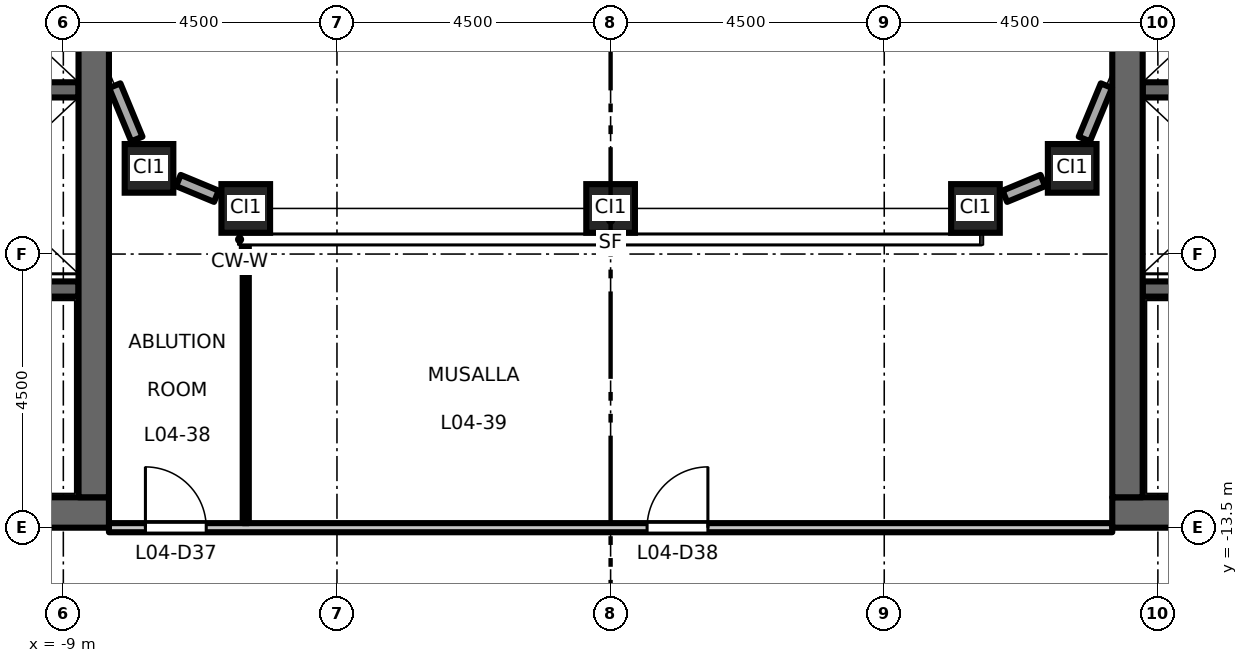
"""IFC4 building model, lengths in metres.
Left out: names, types, materials, properties, quantities, classifications, styles, units other than length and angle.
Written with IfcOpenShell. Run it as: python <this file> out.ifc"""

import sys

from ifc_helpers import new_model, si_unit, direction, frame, frame_2d, origin, origin_2d, place, context, subcontext, project, spatial, rectangle, hollow_rectangle, extrude, element, fill, save


model = new_model("IFC4")
c1 = context("Model", 3, precision=1e-05, world=origin(), true_north=direction((0.0, 1.0)))
c2 = subcontext(c1, "Body", "Model", "MODEL_VIEW")
j1 = project(units=[si_unit("LENGTHUNIT", "METRE"), si_unit("PLANEANGLEUNIT", "RADIAN")], contexts=[c1])
p1 = place(None, origin())
s1 = spatial("IfcSite", under=j1, at=p1, CompositionType="ELEMENT")
p2 = place(p1, origin())
s2 = spatial("IfcBuilding", under=s1, at=p2, CompositionType="ELEMENT")
p3 = place(p2, frame((0.0, 0.0, 22.2)))
s3 = spatial("IfcBuildingStorey", under=s2, at=p3, CompositionType="ELEMENT", Elevation=22.2)
for number, where, z_axis, x_axis in (
    (1, (-7.591, -7.591, 0.0), (0.0, 0.0, 1.0), (1.0, 0.0, 0.0)),
    (2, (-6.0, -8.25, 0.0), (0.0, 0.0, 1.0), (1.0, 0.0, 0.0)),
    (3, (0.0, -8.25, 0.0), (0.0, 0.0, 1.0), (1.0, 0.0, 0.0)),
    (4, (6.0, -8.25, 0.0), (0.0, 0.0, 1.0), (1.0, 0.0, 0.0)),
    (5, (7.591, -7.591, 0.0), (0.0, 0.0, 1.0), (1.0, 0.0, 0.0)),
):
    element("IfcColumn", number, at=place(p3, frame(where, z_axis=z_axis, x_axis=x_axis)), inside=s3, PredefinedType="COLUMN", context=c2, shape_type="SweptSolid", body=[
        extrude(hollow_rectangle(XDim=0.8, YDim=0.8, WallThickness=0.05, at=origin_2d()), origin(), (0.0, 0.0, 1.0), 4.5),
    ])
p4 = place(p3, frame((-8.75, -6.3, 0.0), z_axis=(0.0, 0.0, 1.0), x_axis=(-1.0, 0.0, 0.0)))
e6 = element("IfcWall", 6, at=p4, inside=s3, PredefinedType="SHEAR", context=c2, shape_type="SweptSolid", body=[
    extrude(rectangle(XDim=3.1, YDim=0.25, at=frame_2d((1.55, 0.0))), origin(), (0.0, 0.0, 1.0), 4.35),
])
p5 = place(p3, frame((-8.75, -9.575, 0.0), z_axis=(0.0, 0.0, 1.0), x_axis=(-1.0, 0.0, 0.0)))
e7 = element("IfcWall", 7, at=p5, inside=s3, PredefinedType="SHEAR", context=c2, shape_type="SweptSolid", body=[
    extrude(rectangle(XDim=8.0, YDim=0.25, at=frame_2d((4.0, 0.0))), origin(), (0.0, 0.0, 1.0), 4.35),
])
p6 = place(p5, frame((6.65, 0.0, 0.0)))
e8 = element("IfcOpeningElement", 8, at=p6, cuts=e7, PredefinedType="OPENING", context=c2, shape_type="SweptSolid", body=[
    extrude(rectangle(XDim=1.1, YDim=2.1, at=frame_2d((0.55, 1.05))), frame((0.0, 0.135, 0.0), z_axis=(0.0, -1.0, 0.0), x_axis=(1.0, 0.0, 0.0)), (0.0, 0.0, 1.0), 0.27),
])
p7 = place(p3, frame((-8.25, -13.25, 0.0), z_axis=(0.0, 0.0, 1.0), x_axis=(-1.0, 0.0, 0.0)))
e9 = element("IfcWall", 9, at=p7, inside=s3, PredefinedType="SHEAR", context=c2, shape_type="SweptSolid", body=[
    extrude(rectangle(XDim=13.5, YDim=0.5, at=frame_2d((6.75, 0.0))), origin(), (0.0, 0.0, 1.0), 4.35),
])
p8 = place(p3, frame((-8.5, -13.0, 0.0), z_axis=(0.0, 0.0, 1.0), x_axis=(0.0, 1.0, 0.0)))
e10 = element("IfcWall", 10, at=p8, inside=s3, PredefinedType="SHEAR", context=c2, shape_type="SweptSolid", body=[
    extrude(rectangle(XDim=26.0, YDim=0.5, at=frame_2d((13.0, 0.0))), origin(), (0.0, 0.0, 1.0), 4.35),
])
p9 = place(p3, frame((8.75, -6.3, 0.0), z_axis=(0.0, 0.0, 1.0), x_axis=(1.0, 0.0, 0.0)))
e11 = element("IfcWall", 11, at=p9, inside=s3, PredefinedType="SHEAR", context=c2, shape_type="SweptSolid", body=[
    extrude(rectangle(XDim=3.1, YDim=0.25, at=frame_2d((1.55, 0.0))), origin(), (0.0, 0.0, 1.0), 4.35),
])
p10 = place(p3, frame((8.75, -9.575, 0.0), z_axis=(0.0, 0.0, 1.0), x_axis=(1.0, 0.0, 0.0)))
e12 = element("IfcWall", 12, at=p10, inside=s3, PredefinedType="SHEAR", context=c2, shape_type="SweptSolid", body=[
    extrude(rectangle(XDim=8.0, YDim=0.25, at=frame_2d((4.0, 0.0))), origin(), (0.0, 0.0, 1.0), 4.35),
])
p11 = place(p10, frame((6.65, 0.0, 0.0)))
e13 = element("IfcOpeningElement", 13, at=p11, cuts=e12, PredefinedType="OPENING", context=c2, shape_type="SweptSolid", body=[
    extrude(rectangle(XDim=1.1, YDim=2.1, at=frame_2d((0.55, 1.05))), frame((0.0, 0.135, 0.0), z_axis=(0.0, -1.0, 0.0), x_axis=(1.0, 0.0, 0.0)), (0.0, 0.0, 1.0), 0.27),
])
p12 = place(p3, frame((8.25, -13.25, 0.0), z_axis=(0.0, 0.0, 1.0), x_axis=(1.0, 0.0, 0.0)))
e14 = element("IfcWall", 14, at=p12, inside=s3, PredefinedType="SHEAR", context=c2, shape_type="SweptSolid", body=[
    extrude(rectangle(XDim=13.5, YDim=0.5, at=frame_2d((6.75, 0.0))), origin(), (0.0, 0.0, 1.0), 4.35),
])
p13 = place(p3, frame((8.5, -13.0, 0.0), z_axis=(0.0, 0.0, 1.0), x_axis=(0.0, 1.0, 0.0)))
e15 = element("IfcWall", 15, at=p13, inside=s3, PredefinedType="SHEAR", context=c2, shape_type="SweptSolid", body=[
    extrude(rectangle(XDim=26.0, YDim=0.5, at=frame_2d((13.0, 0.0))), origin(), (0.0, 0.0, 1.0), 4.35),
])
p14 = place(p3, frame((6.483, -8.05, 0.0), z_axis=(0.0, 0.0, 1.0), x_axis=(0.923854141361, 0.382744726273, 0.0)))
e16 = element("IfcWall", 16, at=p14, inside=s3, PredefinedType="STANDARD", context=c2, shape_type="SweptSolid", body=[
    extrude(rectangle(XDim=0.677, YDim=0.2, at=frame_2d((0.338, 0.0))), origin(), (0.0, 0.0, 1.0), 3.73),
])
for number, where, z_axis, x_axis in (
    (17, (7.791, -7.108, 0.0), (0.0, 0.0, 1.0), (0.383, 0.924, 0.0)),
    (18, (-8.154, -6.231, 0.0), (0.0, 0.0, 1.0), (0.383, -0.924, 0.0)),
):
    element("IfcWall", number, at=place(p3, frame(where, z_axis=z_axis, x_axis=x_axis)), inside=s3, PredefinedType="STANDARD", context=c2, shape_type="SweptSolid", body=[
        extrude(rectangle(XDim=0.949, YDim=0.2, at=frame_2d((0.475, 0.0))), origin(), (0.0, 0.0, 1.0), 3.73),
    ])
p15 = place(p3, frame((-7.108, -7.791, 0.0), z_axis=(0.0, 0.0, 1.0), x_axis=(0.923854141361, -0.382744726273, 0.0)))
e19 = element("IfcWall", 19, at=p15, inside=s3, PredefinedType="STANDARD", context=c2, shape_type="SweptSolid", body=[
    extrude(rectangle(XDim=0.677, YDim=0.2, at=frame_2d((0.338, 0.0))), origin(), (0.0, 0.0, 1.0), 3.73),
])
p16 = place(p3, frame((-8.25, -13.5, 0.0), z_axis=(0.0, 0.0, 1.0), x_axis=(1.0, 0.0, 0.0)))
e20 = element("IfcWall", 20, at=p16, inside=s3, PredefinedType="PARTITIONING", context=c2, shape_type="SweptSolid", body=[
    extrude(rectangle(XDim=16.5, YDim=0.15, at=frame_2d((8.25, 0.0))), origin(), (0.0, 0.0, 1.0), 3.85),
])
p17 = place(p16, frame((0.6, 0.0, 0.0)))
e21 = element("IfcOpeningElement", 21, at=p17, cuts=e20, PredefinedType="OPENING", context=c2, shape_type="SweptSolid", body=[
    extrude(rectangle(XDim=1.0, YDim=2.1, at=frame_2d((0.5, 1.05))), frame((0.0, 0.085, 0.0), z_axis=(0.0, -1.0, 0.0), x_axis=(1.0, 0.0, 0.0)), (0.0, 0.0, 1.0), 0.17),
])
p18 = place(p16, frame((8.85, 0.0, 0.0)))
e22 = element("IfcOpeningElement", 22, at=p18, cuts=e20, PredefinedType="OPENING", context=c2, shape_type="SweptSolid", body=[
    extrude(rectangle(XDim=1.0, YDim=2.1, at=frame_2d((0.5, 1.05))), frame((0.0, 0.085, 0.0), z_axis=(0.0, -1.0, 0.0), x_axis=(1.0, 0.0, 0.0)), (0.0, 0.0, 1.0), 0.17),
])
p19 = place(p3, frame((-6.0, -13.425, 0.0), z_axis=(0.0, 0.0, 1.0), x_axis=(0.0, 1.0, 0.0)))
e23 = element("IfcWall", 23, at=p19, inside=s3, PredefinedType="PARTITIONING", context=c2, shape_type="SweptSolid", body=[
    extrude(rectangle(XDim=4.725, YDim=0.1, at=frame_2d((2.363, 0.0))), origin(), (0.0, 0.0, 1.0), 4.35),
])
p20 = place(p17, origin())
e24 = element("IfcDoor", 24, at=p20, inside=s3, OperationType="SINGLE_SWING_LEFT", PredefinedType="DOOR", context=c2, shape_type="SweptSolid", body=[
    extrude(rectangle(XDim=1.0, YDim=2.1, at=frame_2d((0.5, 1.05))), frame((0.0, 0.025, 0.0), z_axis=(0.0, -1.0, 0.0), x_axis=(1.0, 0.0, 0.0)), (0.0, 0.0, 1.0), 0.05),
])
fill(e21, e24)
p21 = place(p18, origin())
e25 = element("IfcDoor", 25, at=p21, inside=s3, OperationType="SINGLE_SWING_RIGHT", PredefinedType="DOOR", context=c2, shape_type="SweptSolid", body=[
    extrude(rectangle(XDim=1.0, YDim=2.1, at=frame_2d((0.5, 1.05))), frame((0.0, 0.025, 0.0), z_axis=(0.0, -1.0, 0.0), x_axis=(1.0, 0.0, 0.0)), (0.0, 0.0, 1.0), 0.05),
])
fill(e22, e25)
save(model, sys.argv[1])
